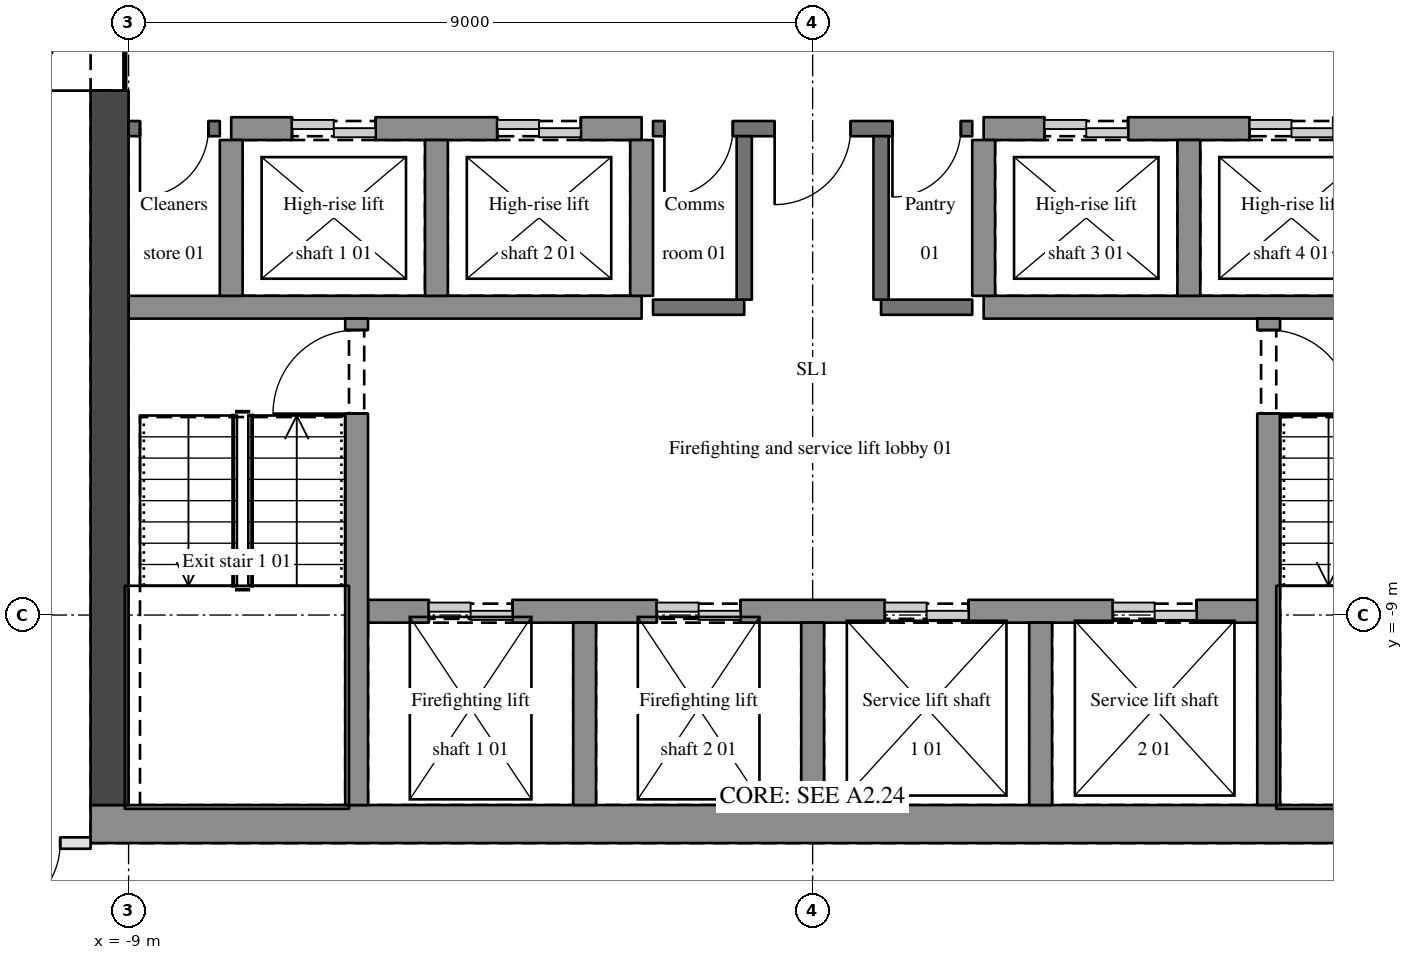
"""IFC4 building model, lengths in metres.
Left out: names, types, materials, properties, quantities, classifications, styles, units other than length and angle.
Written with IfcOpenShell. Run it as: python <this file> out.ifc"""

import sys

from ifc_helpers import new_model, si_unit, direction, frame, frame_2d, origin, place, context, subcontext, project, spatial, rectangle, extrude, element, fill, save


model = new_model("IFC4")
c1 = context("Model", 3, precision=1e-05, world=origin(), true_north=direction((0.0, 1.0)))
c2 = subcontext(c1, "Body", "Model", "MODEL_VIEW")
j1 = project(units=[si_unit("LENGTHUNIT", "METRE"), si_unit("PLANEANGLEUNIT", "RADIAN")], contexts=[c1])
p1 = place(None, origin())
s1 = spatial("IfcSite", under=j1, at=p1, CompositionType="ELEMENT")
p2 = place(p1, origin())
s2 = spatial("IfcBuilding", under=s1, at=p2, CompositionType="ELEMENT")
p3 = place(p2, frame((0.0, 0.0, 172.2)))
s3 = spatial("IfcBuildingStorey", under=s2, at=p3, CompositionType="ELEMENT", Elevation=172.2)
p4 = place(p3, frame((-9.5, -11.75, 0.0), z_axis=(0.0, 0.0, 1.0), x_axis=(1.0, 0.0, 0.0)))
e1 = element("IfcWall", 1, at=p4, inside=s3, PredefinedType="SHEAR", context=c2, shape_type="SweptSolid", body=[
    extrude(rectangle(XDim=19.0, YDim=0.5, at=frame_2d((9.5, 0.0))), origin(), (0.0, 0.0, 1.0), 3.15),
])
p5 = place(p3, frame((-9.25, -11.5, 0.0), z_axis=(0.0, 0.0, 1.0), x_axis=(0.0, 1.0, 0.0)))
e2 = element("IfcWall", 2, at=p5, inside=s3, PredefinedType="SHEAR", context=c2, shape_type="SweptSolid", body=[
    extrude(rectangle(XDim=11.65, YDim=0.5, at=frame_2d((5.825, 0.0))), origin(), (0.0, 0.0, 1.0), 3.15),
])
p6 = place(p5, frame((9.4, 0.0, 0.0)))
e3 = element("IfcOpeningElement", 3, at=p6, cuts=e2, PredefinedType="OPENING", context=c2, shape_type="SweptSolid", body=[
    extrude(rectangle(XDim=1.8, YDim=2.1, at=frame_2d((0.9, 1.05))), frame((0.0, 0.26, 0.0), z_axis=(0.0, -1.0, 0.0), x_axis=(1.0, 0.0, 0.0)), (0.0, 0.0, 1.0), 0.52),
])
p7 = place(p3, frame((-9.5, -12.0, 0.0), z_axis=(0.0, 0.0, 1.0), x_axis=(-1.0, 0.0, 0.0)))
e4 = element("IfcWall", 4, at=p7, inside=s3, PredefinedType="PARTITIONING", context=c2, shape_type="SweptSolid", body=[
    extrude(rectangle(XDim=1.875, YDim=0.15, at=frame_2d((0.938, 0.0))), origin(), (0.0, 0.0, 1.0), 2.21),
])
p8 = place(p7, frame((0.4, 0.0, 0.0)))
e5 = element("IfcOpeningElement", 5, at=p8, cuts=e4, PredefinedType="OPENING", context=c2, shape_type="SweptSolid", body=[
    extrude(rectangle(XDim=1.0, YDim=2.1, at=frame_2d((0.5, 1.05))), frame((0.0, 0.085, 0.0), z_axis=(0.0, -1.0, 0.0), x_axis=(1.0, 0.0, 0.0)), (0.0, 0.0, 1.0), 0.17),
])
p9 = place(p3, frame((-5.85, -8.95, 0.0), z_axis=(0.0, 0.0, 1.0), x_axis=(1.0, 0.0, 0.0)))
e6 = element("IfcWall", 6, at=p9, inside=s3, PredefinedType="SHEAR", context=c2, shape_type="SweptSolid", body=[
    extrude(rectangle(XDim=11.7, YDim=0.3, at=frame_2d((5.85, 0.0))), origin(), (0.0, 0.0, 1.0), 3.15),
])
p10 = place(p9, frame((0.8, 0.0, 0.0)))
e7 = element("IfcOpeningElement", 7, at=p10, cuts=e6, PredefinedType="OPENING", context=c2, shape_type="SweptSolid", body=[
    extrude(rectangle(XDim=1.1, YDim=2.1, at=frame_2d((0.55, 1.05))), frame((0.0, 0.16, 0.0), z_axis=(0.0, -1.0, 0.0), x_axis=(1.0, 0.0, 0.0)), (0.0, 0.0, 1.0), 0.32),
])
p11 = place(p9, frame((3.8, 0.0, 0.0)))
e8 = element("IfcOpeningElement", 8, at=p11, cuts=e6, PredefinedType="OPENING", context=c2, shape_type="SweptSolid", body=[
    extrude(rectangle(XDim=1.1, YDim=2.1, at=frame_2d((0.55, 1.05))), frame((0.0, 0.16, 0.0), z_axis=(0.0, -1.0, 0.0), x_axis=(1.0, 0.0, 0.0)), (0.0, 0.0, 1.0), 0.32),
])
p12 = place(p9, frame((6.8, 0.0, 0.0)))
e9 = element("IfcOpeningElement", 9, at=p12, cuts=e6, PredefinedType="OPENING", context=c2, shape_type="SweptSolid", body=[
    extrude(rectangle(XDim=1.1, YDim=2.1, at=frame_2d((0.55, 1.05))), frame((0.0, 0.16, 0.0), z_axis=(0.0, -1.0, 0.0), x_axis=(1.0, 0.0, 0.0)), (0.0, 0.0, 1.0), 0.32),
])
p13 = place(p9, frame((9.8, 0.0, 0.0)))
e10 = element("IfcOpeningElement", 10, at=p13, cuts=e6, PredefinedType="OPENING", context=c2, shape_type="SweptSolid", body=[
    extrude(rectangle(XDim=1.1, YDim=2.1, at=frame_2d((0.55, 1.05))), frame((0.0, 0.16, 0.0), z_axis=(0.0, -1.0, 0.0), x_axis=(1.0, 0.0, 0.0)), (0.0, 0.0, 1.0), 0.32),
])
p14 = place(p3, frame((-9.0, -4.95, 0.0), z_axis=(0.0, 0.0, 1.0), x_axis=(1.0, 0.0, 0.0)))
e11 = element("IfcWall", 11, at=p14, inside=s3, PredefinedType="SHEAR", context=c2, shape_type="SweptSolid", body=[
    extrude(rectangle(XDim=6.75, YDim=0.3, at=frame_2d((3.375, 0.0))), origin(), (0.0, 0.0, 1.0), 3.15),
])
for number, where, z_axis, x_axis in (
    (12, (-2.1, -4.95, 0.0), (0.0, 0.0, 1.0), (1.0, 0.0, 0.0)),
    (13, (0.9, -4.95, 0.0), (0.0, 0.0, 1.0), (1.0, 0.0, 0.0)),
):
    element("IfcWall", number, at=place(p3, frame(where, z_axis=z_axis, x_axis=x_axis)), inside=s3, PredefinedType="SOLIDWALL", context=c2, shape_type="SweptSolid", body=[
        extrude(rectangle(XDim=1.2, YDim=0.2, at=frame_2d((0.6, 0.0))), origin(), (0.0, 0.0, 1.0), 2.85),
    ])
p15 = place(p3, frame((2.25, -4.95, 0.0), z_axis=(0.0, 0.0, 1.0), x_axis=(1.0, 0.0, 0.0)))
e14 = element("IfcWall", 14, at=p15, inside=s3, PredefinedType="SHEAR", context=c2, shape_type="SweptSolid", body=[
    extrude(rectangle(XDim=6.75, YDim=0.3, at=frame_2d((3.375, 0.0))), origin(), (0.0, 0.0, 1.0), 3.15),
])
p16 = place(p3, frame((-7.8, -2.6, 0.0), z_axis=(0.0, 0.0, 1.0), x_axis=(-1.0, 0.0, 0.0)))
e15 = element("IfcWall", 15, at=p16, inside=s3, PredefinedType="SOLIDWALL", context=c2, shape_type="SweptSolid", body=[
    extrude(rectangle(XDim=1.2, YDim=0.2, at=frame_2d((0.6, 0.0))), origin(), (0.0, 0.0, 1.0), 2.85),
])
p17 = place(p16, frame((0.15, 0.0, 0.0)))
e16 = element("IfcOpeningElement", 16, at=p17, cuts=e15, PredefinedType="OPENING", context=c2, shape_type="SweptSolid", body=[
    extrude(rectangle(XDim=0.9, YDim=2.1, at=frame_2d((0.45, 1.05))), frame((0.0, 0.11, 0.0), z_axis=(0.0, -1.0, 0.0), x_axis=(1.0, 0.0, 0.0)), (0.0, 0.0, 1.0), 0.22),
])
p18 = place(p3, frame((-7.65, -2.6, 0.0), z_axis=(0.0, 0.0, 1.0), x_axis=(1.0, 0.0, 0.0)))
e17 = element("IfcWall", 17, at=p18, inside=s3, PredefinedType="SHEAR", context=c2, shape_type="SweptSolid", body=[
    extrude(rectangle(XDim=5.4, YDim=0.3, at=frame_2d((2.7, 0.0))), origin(), (0.0, 0.0, 1.0), 3.15),
])
p19 = place(p18, frame((0.8, 0.0, 0.0)))
e18 = element("IfcOpeningElement", 18, at=p19, cuts=e17, PredefinedType="OPENING", context=c2, shape_type="SweptSolid", body=[
    extrude(rectangle(XDim=1.1, YDim=2.1, at=frame_2d((0.55, 1.05))), frame((0.0, 0.16, 0.0), z_axis=(0.0, -1.0, 0.0), x_axis=(1.0, 0.0, 0.0)), (0.0, 0.0, 1.0), 0.32),
])
p20 = place(p18, frame((3.5, 0.0, 0.0)))
e19 = element("IfcOpeningElement", 19, at=p20, cuts=e17, PredefinedType="OPENING", context=c2, shape_type="SweptSolid", body=[
    extrude(rectangle(XDim=1.1, YDim=2.1, at=frame_2d((0.55, 1.05))), frame((0.0, 0.16, 0.0), z_axis=(0.0, -1.0, 0.0), x_axis=(1.0, 0.0, 0.0)), (0.0, 0.0, 1.0), 0.32),
])
p21 = place(p3, frame((2.1, -2.6, 0.0), z_axis=(0.0, 0.0, 1.0), x_axis=(-1.0, 0.0, 0.0)))
e20 = element("IfcWall", 20, at=p21, inside=s3, PredefinedType="SOLIDWALL", context=c2, shape_type="SweptSolid", body=[
    extrude(rectangle(XDim=4.2, YDim=0.2, at=frame_2d((2.1, 0.0))), origin(), (0.0, 0.0, 1.0), 2.85),
])
p22 = place(p21, frame((1.6, 0.0, 0.0)))
e21 = element("IfcOpeningElement", 21, at=p22, cuts=e20, PredefinedType="OPENING", context=c2, shape_type="SweptSolid", body=[
    extrude(rectangle(XDim=1.0, YDim=2.1, at=frame_2d((0.5, 1.05))), frame((0.0, 0.11, 0.0), z_axis=(0.0, -1.0, 0.0), x_axis=(1.0, 0.0, 0.0)), (0.0, 0.0, 1.0), 0.22),
])
p23 = place(p21, frame((3.15, 0.0, 0.0)))
e22 = element("IfcOpeningElement", 22, at=p23, cuts=e20, PredefinedType="OPENING", context=c2, shape_type="SweptSolid", body=[
    extrude(rectangle(XDim=0.9, YDim=2.1, at=frame_2d((0.45, 1.05))), frame((0.0, 0.11, 0.0), z_axis=(0.0, -1.0, 0.0), x_axis=(1.0, 0.0, 0.0)), (0.0, 0.0, 1.0), 0.22),
])
p24 = place(p21, frame((0.15, 0.0, 0.0)))
e23 = element("IfcOpeningElement", 23, at=p24, cuts=e20, PredefinedType="OPENING", context=c2, shape_type="SweptSolid", body=[
    extrude(rectangle(XDim=0.9, YDim=2.1, at=frame_2d((0.45, 1.05))), frame((0.0, 0.11, 0.0), z_axis=(0.0, -1.0, 0.0), x_axis=(1.0, 0.0, 0.0)), (0.0, 0.0, 1.0), 0.22),
])
p25 = place(p3, frame((2.25, -2.6, 0.0), z_axis=(0.0, 0.0, 1.0), x_axis=(1.0, 0.0, 0.0)))
e24 = element("IfcWall", 24, at=p25, inside=s3, PredefinedType="SHEAR", context=c2, shape_type="SweptSolid", body=[
    extrude(rectangle(XDim=5.4, YDim=0.3, at=frame_2d((2.7, 0.0))), origin(), (0.0, 0.0, 1.0), 3.15),
])
p26 = place(p25, frame((0.8, 0.0, 0.0)))
e25 = element("IfcOpeningElement", 25, at=p26, cuts=e24, PredefinedType="OPENING", context=c2, shape_type="SweptSolid", body=[
    extrude(rectangle(XDim=1.1, YDim=2.1, at=frame_2d((0.55, 1.05))), frame((0.0, 0.16, 0.0), z_axis=(0.0, -1.0, 0.0), x_axis=(1.0, 0.0, 0.0)), (0.0, 0.0, 1.0), 0.32),
])
p27 = place(p25, frame((3.5, 0.0, 0.0)))
e26 = element("IfcOpeningElement", 26, at=p27, cuts=e24, PredefinedType="OPENING", context=c2, shape_type="SweptSolid", body=[
    extrude(rectangle(XDim=1.1, YDim=2.1, at=frame_2d((0.55, 1.05))), frame((0.0, 0.16, 0.0), z_axis=(0.0, -1.0, 0.0), x_axis=(1.0, 0.0, 0.0)), (0.0, 0.0, 1.0), 0.32),
])
p28 = place(p3, frame((-7.65, -4.8, 0.0), z_axis=(0.0, 0.0, 1.0), x_axis=(0.0, 1.0, 0.0)))
e27 = element("IfcWall", 27, at=p28, inside=s3, PredefinedType="SHEAR", context=c2, shape_type="SweptSolid", body=[
    extrude(rectangle(XDim=2.05, YDim=0.3, at=frame_2d((1.025, 0.0))), origin(), (0.0, 0.0, 1.0), 3.15),
])
p29 = place(p3, frame((-6.0, -11.5, 0.0), z_axis=(0.0, 0.0, 1.0), x_axis=(0.0, 1.0, 0.0)))
e28 = element("IfcWall", 28, at=p29, inside=s3, PredefinedType="SHEAR", context=c2, shape_type="SweptSolid", body=[
    extrude(rectangle(XDim=6.4, YDim=0.3, at=frame_2d((3.2, 0.0))), origin(), (0.0, 0.0, 1.0), 3.15),
])
p30 = place(p29, frame((5.15, 0.0, 0.0)))
e29 = element("IfcOpeningElement", 29, at=p30, cuts=e28, PredefinedType="OPENING", context=c2, shape_type="SweptSolid", body=[
    extrude(rectangle(XDim=1.1, YDim=2.1, at=frame_2d((0.55, 1.05))), frame((0.0, 0.16, 0.0), z_axis=(0.0, -1.0, 0.0), x_axis=(1.0, 0.0, 0.0)), (0.0, 0.0, 1.0), 0.32),
])
p31 = place(p3, frame((-4.95, -4.8, 0.0), z_axis=(0.0, 0.0, 1.0), x_axis=(0.0, 1.0, 0.0)))
e30 = element("IfcWall", 30, at=p31, inside=s3, PredefinedType="SHEAR", context=c2, shape_type="SweptSolid", body=[
    extrude(rectangle(XDim=2.05, YDim=0.3, at=frame_2d((1.025, 0.0))), origin(), (0.0, 0.0, 1.0), 3.15),
])
p32 = place(p3, frame((-3.0, -11.5, 0.0), z_axis=(0.0, 0.0, 1.0), x_axis=(0.0, 1.0, 0.0)))
e31 = element("IfcWall", 31, at=p32, inside=s3, PredefinedType="SHEAR", context=c2, shape_type="SweptSolid", body=[
    extrude(rectangle(XDim=2.4, YDim=0.3, at=frame_2d((1.2, 0.0))), origin(), (0.0, 0.0, 1.0), 3.15),
])
p33 = place(p3, frame((-2.25, -4.8, 0.0), z_axis=(0.0, 0.0, 1.0), x_axis=(0.0, 1.0, 0.0)))
e32 = element("IfcWall", 32, at=p33, inside=s3, PredefinedType="SHEAR", context=c2, shape_type="SweptSolid", body=[
    extrude(rectangle(XDim=2.05, YDim=0.3, at=frame_2d((1.025, 0.0))), origin(), (0.0, 0.0, 1.0), 3.15),
])
p34 = place(p3, frame((-0.9, -4.85, 0.0), z_axis=(0.0, 0.0, 1.0), x_axis=(0.0, 1.0, 0.0)))
e33 = element("IfcWall", 33, at=p34, inside=s3, PredefinedType="SOLIDWALL", context=c2, shape_type="SweptSolid", body=[
    extrude(rectangle(XDim=2.15, YDim=0.2, at=frame_2d((1.075, 0.0))), origin(), (0.0, 0.0, 1.0), 2.85),
])
p35 = place(p3, frame((0.0, -11.5, 0.0), z_axis=(0.0, 0.0, 1.0), x_axis=(0.0, 1.0, 0.0)))
e34 = element("IfcWall", 34, at=p35, inside=s3, PredefinedType="SHEAR", context=c2, shape_type="SweptSolid", body=[
    extrude(rectangle(XDim=2.4, YDim=0.3, at=frame_2d((1.2, 0.0))), origin(), (0.0, 0.0, 1.0), 3.15),
])
p36 = place(p3, frame((0.9, -4.85, 0.0), z_axis=(0.0, 0.0, 1.0), x_axis=(0.0, 1.0, 0.0)))
e35 = element("IfcWall", 35, at=p36, inside=s3, PredefinedType="SOLIDWALL", context=c2, shape_type="SweptSolid", body=[
    extrude(rectangle(XDim=2.15, YDim=0.2, at=frame_2d((1.075, 0.0))), origin(), (0.0, 0.0, 1.0), 2.85),
])
p37 = place(p3, frame((2.25, -4.8, 0.0), z_axis=(0.0, 0.0, 1.0), x_axis=(0.0, 1.0, 0.0)))
e36 = element("IfcWall", 36, at=p37, inside=s3, PredefinedType="SHEAR", context=c2, shape_type="SweptSolid", body=[
    extrude(rectangle(XDim=2.05, YDim=0.3, at=frame_2d((1.025, 0.0))), origin(), (0.0, 0.0, 1.0), 3.15),
])
p38 = place(p3, frame((3.0, -11.5, 0.0), z_axis=(0.0, 0.0, 1.0), x_axis=(0.0, 1.0, 0.0)))
e37 = element("IfcWall", 37, at=p38, inside=s3, PredefinedType="SHEAR", context=c2, shape_type="SweptSolid", body=[
    extrude(rectangle(XDim=2.4, YDim=0.3, at=frame_2d((1.2, 0.0))), origin(), (0.0, 0.0, 1.0), 3.15),
])
p39 = place(p3, frame((4.95, -4.8, 0.0), z_axis=(0.0, 0.0, 1.0), x_axis=(0.0, 1.0, 0.0)))
e38 = element("IfcWall", 38, at=p39, inside=s3, PredefinedType="SHEAR", context=c2, shape_type="SweptSolid", body=[
    extrude(rectangle(XDim=2.05, YDim=0.3, at=frame_2d((1.025, 0.0))), origin(), (0.0, 0.0, 1.0), 3.15),
])
p40 = place(p3, frame((6.0, -5.1, 0.0), z_axis=(0.0, 0.0, 1.0), x_axis=(0.0, -1.0, 0.0)))
e39 = element("IfcWall", 39, at=p40, inside=s3, PredefinedType="SHEAR", context=c2, shape_type="SweptSolid", body=[
    extrude(rectangle(XDim=6.4, YDim=0.3, at=frame_2d((3.2, 0.0))), origin(), (0.0, 0.0, 1.0), 3.15),
])
p41 = place(p40, frame((0.15, 0.0, 0.0)))
e40 = element("IfcOpeningElement", 40, at=p41, cuts=e39, PredefinedType="OPENING", context=c2, shape_type="SweptSolid", body=[
    extrude(rectangle(XDim=1.1, YDim=2.1, at=frame_2d((0.55, 1.05))), frame((0.0, 0.16, 0.0), z_axis=(0.0, -1.0, 0.0), x_axis=(1.0, 0.0, 0.0)), (0.0, 0.0, 1.0), 0.32),
])
p42 = place(p6, origin())
e41 = element("IfcDoor", 41, at=p42, inside=s3, OperationType="DOUBLE_DOOR_SINGLE_SWING", PredefinedType="DOOR", context=c2, shape_type="SweptSolid", body=[
    extrude(rectangle(XDim=1.8, YDim=2.1, at=frame_2d((0.9, 1.05))), frame((0.0, 0.025, 0.0), z_axis=(0.0, -1.0, 0.0), x_axis=(1.0, 0.0, 0.0)), (0.0, 0.0, 1.0), 0.05),
])
fill(e3, e41)
p43 = place(p22, origin())
e42 = element("IfcDoor", 42, at=p43, inside=s3, OperationType="SINGLE_SWING_RIGHT", PredefinedType="DOOR", context=c2, shape_type="SweptSolid", body=[
    extrude(rectangle(XDim=1.0, YDim=2.1, at=frame_2d((0.5, 1.05))), frame((0.0, 0.025, 0.0), z_axis=(0.0, -1.0, 0.0), x_axis=(1.0, 0.0, 0.0)), (0.0, 0.0, 1.0), 0.05),
])
fill(e21, e42)
p44 = place(p30, origin())
e43 = element("IfcDoor", 43, at=p44, inside=s3, OperationType="SINGLE_SWING_LEFT", PredefinedType="DOOR", context=c2, shape_type="SweptSolid", body=[
    extrude(rectangle(XDim=1.1, YDim=2.1, at=frame_2d((0.55, 1.05))), frame((0.0, 0.025, 0.0), z_axis=(0.0, -1.0, 0.0), x_axis=(1.0, 0.0, 0.0)), (0.0, 0.0, 1.0), 0.05),
])
fill(e29, e43)
p45 = place(p41, origin())
e44 = element("IfcDoor", 44, at=p45, inside=s3, OperationType="SINGLE_SWING_RIGHT", PredefinedType="DOOR", context=c2, shape_type="SweptSolid", body=[
    extrude(rectangle(XDim=1.1, YDim=2.1, at=frame_2d((0.55, 1.05))), frame((0.0, 0.025, 0.0), z_axis=(0.0, -1.0, 0.0), x_axis=(1.0, 0.0, 0.0)), (0.0, 0.0, 1.0), 0.05),
])
fill(e40, e44)
p46 = place(p23, origin())
e45 = element("IfcDoor", 45, at=p46, inside=s3, OperationType="SINGLE_SWING_RIGHT", PredefinedType="DOOR", context=c2, shape_type="SweptSolid", body=[
    extrude(rectangle(XDim=0.9, YDim=2.1, at=frame_2d((0.45, 1.05))), frame((0.0, 0.025, 0.0), z_axis=(0.0, -1.0, 0.0), x_axis=(1.0, 0.0, 0.0)), (0.0, 0.0, 1.0), 0.05),
])
fill(e22, e45)
p47 = place(p24, origin())
e46 = element("IfcDoor", 46, at=p47, inside=s3, OperationType="SINGLE_SWING_RIGHT", PredefinedType="DOOR", context=c2, shape_type="SweptSolid", body=[
    extrude(rectangle(XDim=0.9, YDim=2.1, at=frame_2d((0.45, 1.05))), frame((0.0, 0.025, 0.0), z_axis=(0.0, -1.0, 0.0), x_axis=(1.0, 0.0, 0.0)), (0.0, 0.0, 1.0), 0.05),
])
fill(e23, e46)
p48 = place(p17, origin())
e47 = element("IfcDoor", 47, at=p48, inside=s3, OperationType="SINGLE_SWING_RIGHT", PredefinedType="DOOR", context=c2, shape_type="SweptSolid", body=[
    extrude(rectangle(XDim=0.9, YDim=2.1, at=frame_2d((0.45, 1.05))), frame((0.0, 0.025, 0.0), z_axis=(0.0, -1.0, 0.0), x_axis=(1.0, 0.0, 0.0)), (0.0, 0.0, 1.0), 0.05),
])
fill(e16, e47)
p49 = place(p8, origin())
e48 = element("IfcDoor", 48, at=p49, inside=s3, OperationType="SINGLE_SWING_RIGHT", PredefinedType="DOOR", context=c2, shape_type="SweptSolid", body=[
    extrude(rectangle(XDim=1.0, YDim=2.1, at=frame_2d((0.5, 1.05))), frame((0.0, 0.025, 0.0), z_axis=(0.0, -1.0, 0.0), x_axis=(1.0, 0.0, 0.0)), (0.0, 0.0, 1.0), 0.05),
])
fill(e5, e48)
p50 = place(p10, origin())
e49 = element("IfcDoor", 49, at=p50, inside=s3, OperationType="DOUBLE_DOOR_SLIDING", PredefinedType="DOOR", context=c2, shape_type="SweptSolid", body=[
    extrude(rectangle(XDim=1.1, YDim=2.1, at=frame_2d((0.55, 1.05))), frame((0.0, 0.025, 0.0), z_axis=(0.0, -1.0, 0.0), x_axis=(1.0, 0.0, 0.0)), (0.0, 0.0, 1.0), 0.05),
])
fill(e7, e49)
p51 = place(p11, origin())
e50 = element("IfcDoor", 50, at=p51, inside=s3, OperationType="DOUBLE_DOOR_SLIDING", PredefinedType="DOOR", context=c2, shape_type="SweptSolid", body=[
    extrude(rectangle(XDim=1.1, YDim=2.1, at=frame_2d((0.55, 1.05))), frame((0.0, 0.025, 0.0), z_axis=(0.0, -1.0, 0.0), x_axis=(1.0, 0.0, 0.0)), (0.0, 0.0, 1.0), 0.05),
])
fill(e8, e50)
p52 = place(p19, origin())
e51 = element("IfcDoor", 51, at=p52, inside=s3, OperationType="DOUBLE_DOOR_SLIDING", PredefinedType="DOOR", context=c2, shape_type="SweptSolid", body=[
    extrude(rectangle(XDim=1.1, YDim=2.1, at=frame_2d((0.55, 1.05))), frame((0.0, 0.025, 0.0), z_axis=(0.0, -1.0, 0.0), x_axis=(1.0, 0.0, 0.0)), (0.0, 0.0, 1.0), 0.05),
])
fill(e18, e51)
p53 = place(p20, origin())
e52 = element("IfcDoor", 52, at=p53, inside=s3, OperationType="DOUBLE_DOOR_SLIDING", PredefinedType="DOOR", context=c2, shape_type="SweptSolid", body=[
    extrude(rectangle(XDim=1.1, YDim=2.1, at=frame_2d((0.55, 1.05))), frame((0.0, 0.025, 0.0), z_axis=(0.0, -1.0, 0.0), x_axis=(1.0, 0.0, 0.0)), (0.0, 0.0, 1.0), 0.05),
])
fill(e19, e52)
p54 = place(p26, origin())
e53 = element("IfcDoor", 53, at=p54, inside=s3, OperationType="DOUBLE_DOOR_SLIDING", PredefinedType="DOOR", context=c2, shape_type="SweptSolid", body=[
    extrude(rectangle(XDim=1.1, YDim=2.1, at=frame_2d((0.55, 1.05))), frame((0.0, 0.025, 0.0), z_axis=(0.0, -1.0, 0.0), x_axis=(1.0, 0.0, 0.0)), (0.0, 0.0, 1.0), 0.05),
])
fill(e25, e53)
p55 = place(p27, origin())
e54 = element("IfcDoor", 54, at=p55, inside=s3, OperationType="DOUBLE_DOOR_SLIDING", PredefinedType="DOOR", context=c2, shape_type="SweptSolid", body=[
    extrude(rectangle(XDim=1.1, YDim=2.1, at=frame_2d((0.55, 1.05))), frame((0.0, 0.025, 0.0), z_axis=(0.0, -1.0, 0.0), x_axis=(1.0, 0.0, 0.0)), (0.0, 0.0, 1.0), 0.05),
])
fill(e26, e54)
p56 = place(p12, origin())
e55 = element("IfcDoor", 55, at=p56, inside=s3, OperationType="DOUBLE_DOOR_SLIDING", PredefinedType="DOOR", context=c2, shape_type="SweptSolid", body=[
    extrude(rectangle(XDim=1.1, YDim=2.1, at=frame_2d((0.55, 1.05))), frame((0.0, 0.025, 0.0), z_axis=(0.0, -1.0, 0.0), x_axis=(1.0, 0.0, 0.0)), (0.0, 0.0, 1.0), 0.05),
])
fill(e9, e55)
p57 = place(p13, origin())
e56 = element("IfcDoor", 56, at=p57, inside=s3, OperationType="DOUBLE_DOOR_SLIDING", PredefinedType="DOOR", context=c2, shape_type="SweptSolid", body=[
    extrude(rectangle(XDim=1.1, YDim=2.1, at=frame_2d((0.55, 1.05))), frame((0.0, 0.025, 0.0), z_axis=(0.0, -1.0, 0.0), x_axis=(1.0, 0.0, 0.0)), (0.0, 0.0, 1.0), 0.05),
])
fill(e10, e56)
save(model, sys.argv[1])
